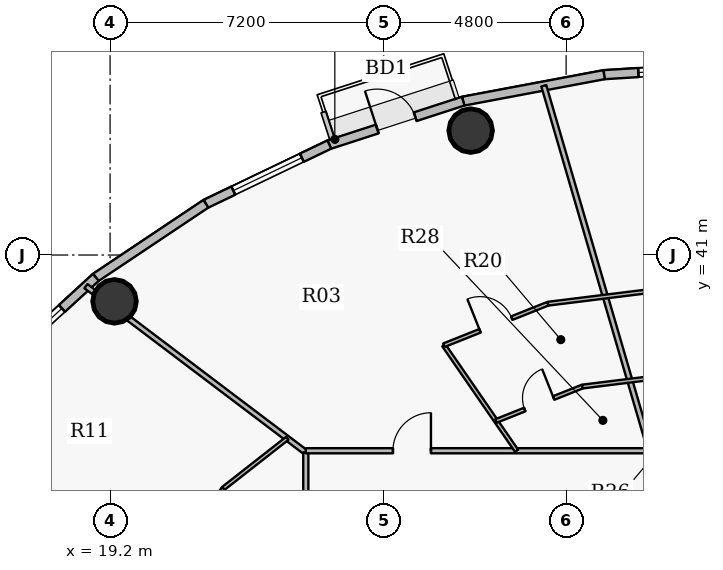
"""IFC4 building model, lengths in metres.
Left out: names, types, materials, properties, quantities, classifications, styles, units other than length and angle.
Written with IfcOpenShell. Run it as: python <this file> out.ifc"""

import sys

from ifc_helpers import new_model, si_unit, direction, frame, frame_2d, origin, origin_2d, place, context, subcontext, project, spatial, rectangle, hollow_circle, extrude, source, transform, mapped, element, fill, save


model = new_model("IFC4")
c1 = context("Model", 3, precision=1e-05, world=origin(), true_north=direction((0.0, 1.0)))
c2 = subcontext(c1, "Body", "Model", "MODEL_VIEW")
j1 = project(units=[si_unit("LENGTHUNIT", "METRE"), si_unit("PLANEANGLEUNIT", "RADIAN")], contexts=[c1])
p1 = place(None, origin())
s1 = spatial("IfcSite", under=j1, at=p1, CompositionType="ELEMENT")
p2 = place(p1, origin())
s2 = spatial("IfcBuilding", under=s1, at=p2, CompositionType="ELEMENT")
p3 = place(p2, frame((0.0, 0.0, 217.8)))
s3 = spatial("IfcBuildingStorey", under=s2, at=p3, CompositionType="ELEMENT", Elevation=217.8)
for number, where, z_axis, x_axis in (
    (1, (28.688, 44.273, 0.0), (0.0, 0.0, 1.0), (1.0, 0.0, 0.0)),
    (2, (19.317, 39.781, 0.0), (0.0, 0.0, 1.0), (1.0, 0.0, 0.0)),
):
    element("IfcColumn", number, at=place(p3, frame(where, z_axis=z_axis, x_axis=x_axis)), inside=s3, PredefinedType="COLUMN", context=c2, shape_type="SweptSolid", body=[
        extrude(hollow_circle(Radius=0.575, WallThickness=0.036, at=origin_2d()), origin(), (0.0, 0.0, 1.0), 3.75),
    ])
p4 = place(p3, frame((32.198, 45.746, 0.0), z_axis=(0.0, 0.0, 1.0), x_axis=(0.998108785312, 0.06147237333, 0.0)))
e3 = element("IfcWall", 3, at=p4, inside=s3, PredefinedType="SOLIDWALL", context=c2, shape_type="SweptSolid", body=[
    extrude(rectangle(XDim=3.809, YDim=0.24, at=frame_2d((1.904, 0.0))), origin(), (0.0, 0.0, 1.0), 3.5),
])
p5 = place(p4, frame((0.905, 0.0, 0.9)))
e4 = element("IfcOpeningElement", 4, at=p5, cuts=e3, PredefinedType="OPENING", context=c2, shape_type="SweptSolid", body=[
    extrude(rectangle(XDim=2.0, YDim=1.75, at=origin_2d()), frame((1.0, 0.13, 0.875), z_axis=(0.0, -1.0, 0.0), x_axis=(1.0, 0.0, 0.0)), (0.0, 0.0, 1.0), 0.26),
])
p6 = place(p3, frame((28.491, 45.049, 0.0), z_axis=(0.0, 0.0, 1.0), x_axis=(0.982784898575, 0.184753465822, 0.0)))
e5 = element("IfcWall", 5, at=p6, inside=s3, PredefinedType="SOLIDWALL", context=c2, shape_type="SweptSolid", body=[
    extrude(rectangle(XDim=3.773, YDim=0.24, at=frame_2d((1.886, 0.0))), origin(), (0.0, 0.0, 1.0), 3.5),
])
p7 = place(p3, frame((24.969, 43.906, 0.0), z_axis=(0.0, 0.0, 1.0), x_axis=(0.951210789182, 0.308541787354, 0.0)))
e6 = element("IfcWall", 6, at=p7, inside=s3, PredefinedType="SOLIDWALL", context=c2, shape_type="SweptSolid", body=[
    extrude(rectangle(XDim=3.702, YDim=0.24, at=frame_2d((1.851, 0.0))), origin(), (0.0, 0.0, 1.0), 3.5),
])
p8 = place(p7, frame((1.326, 0.0, 0.0)))
e7 = element("IfcOpeningElement", 7, at=p8, cuts=e6, PredefinedType="OPENING", context=c2, shape_type="SweptSolid", body=[
    extrude(rectangle(XDim=1.05, YDim=2.15, at=origin_2d()), frame((0.525, 0.13, 1.075), z_axis=(0.0, -1.0, 0.0), x_axis=(1.0, 0.0, 0.0)), (0.0, 0.0, 1.0), 0.26),
])
p9 = place(p3, frame((21.72, 42.348, 0.0), z_axis=(0.0, 0.0, 1.0), x_axis=(0.901598104751, 0.432574684313, 0.0)))
e8 = element("IfcWall", 8, at=p9, inside=s3, PredefinedType="SOLIDWALL", context=c2, shape_type="SweptSolid", body=[
    extrude(rectangle(XDim=3.604, YDim=0.24, at=frame_2d((1.802, 0.0))), origin(), (0.0, 0.0, 1.0), 3.5),
])
p10 = place(p9, frame((0.802, 0.0, 0.9)))
e9 = element("IfcOpeningElement", 9, at=p10, cuts=e8, PredefinedType="OPENING", context=c2, shape_type="SweptSolid", body=[
    extrude(rectangle(XDim=2.0, YDim=1.75, at=origin_2d()), frame((1.0, 0.13, 0.875), z_axis=(0.0, -1.0, 0.0), x_axis=(1.0, 0.0, 0.0)), (0.0, 0.0, 1.0), 0.26),
])
p11 = place(p3, frame((18.824, 40.411, 0.0), z_axis=(0.0, 0.0, 1.0), x_axis=(0.831262496074, 0.555880079352, 0.0)))
e10 = element("IfcWall", 10, at=p11, inside=s3, PredefinedType="SOLIDWALL", context=c2, shape_type="SweptSolid", body=[
    extrude(rectangle(XDim=3.484, YDim=0.24, at=frame_2d((1.742, 0.0))), origin(), (0.0, 0.0, 1.0), 3.5),
])
p12 = place(p3, frame((16.352, 38.145, 0.0), z_axis=(0.0, 0.0, 1.0), x_axis=(0.737123922599, 0.675757591694, 0.0)))
e11 = element("IfcWall", 11, at=p12, inside=s3, PredefinedType="SOLIDWALL", context=c2, shape_type="SweptSolid", body=[
    extrude(rectangle(XDim=3.354, YDim=0.24, at=frame_2d((1.677, 0.0))), origin(), (0.0, 0.0, 1.0), 3.5),
])
p13 = place(p12, frame((0.896, 0.0, 0.9)))
e12 = element("IfcOpeningElement", 12, at=p13, cuts=e11, PredefinedType="OPENING", context=c2, shape_type="SweptSolid", body=[
    extrude(rectangle(XDim=1.25, YDim=1.65, at=origin_2d()), frame((0.625, 0.13, 0.825), z_axis=(0.0, -1.0, 0.0), x_axis=(1.0, 0.0, 0.0)), (0.0, 0.0, 1.0), 0.26),
])
p14 = place(p3, frame((13.997, 34.921, 0.0), z_axis=(0.0, 0.0, 1.0), x_axis=(0.940885654064, -0.338724351023, 0.0)))
e13 = element("IfcWall", 13, at=p14, inside=s3, PredefinedType="PARTITIONING", context=c2, shape_type="SweptSolid", body=[
    extrude(rectangle(XDim=7.082, YDim=0.1, at=frame_2d((3.541, 0.0))), origin(), (0.0, 0.0, 1.0), 2.985),
])
p15 = place(p3, frame((18.565, 40.18, 0.0), z_axis=(0.0, 0.0, 1.0), x_axis=(0.797711861377, -0.603038793295, 0.0)))
e14 = element("IfcWall", 14, at=p15, inside=s3, PredefinedType="PARTITIONING", context=c2, shape_type="SweptSolid", body=[
    extrude(rectangle(XDim=7.252, YDim=0.135, at=frame_2d((3.626, 0.0))), origin(), (0.0, 0.0, 1.0), 2.935),
])
p16 = place(p3, frame((19.756, 31.133, 0.0), z_axis=(0.0, 0.0, 1.0), x_axis=(0.545406924684, 0.83817139447, 0.0)))
e15 = element("IfcWall", 15, at=p16, inside=s3, PredefinedType="PARTITIONING", context=c2, shape_type="SweptSolid", body=[
    extrude(rectangle(XDim=4.448, YDim=0.1, at=frame_2d((2.224, 0.0))), origin(), (0.0, 0.0, 1.0), 2.935),
])
p17 = place(p16, frame((2.583, 0.0, 0.0)))
e16 = element("IfcOpeningElement", 16, at=p17, cuts=e15, PredefinedType="OPENING", context=c2, shape_type="SweptSolid", body=[
    extrude(rectangle(XDim=0.9, YDim=2.1, at=origin_2d()), frame((0.45, 0.06, 1.05), z_axis=(0.0, -1.0, 0.0), x_axis=(1.0, 0.0, 0.0)), (0.0, 0.0, 1.0), 0.12),
])
p18 = place(p3, frame((22.182, 34.861, 0.0), z_axis=(0.0, 0.0, 1.0), x_axis=(0.787401156588, 0.616440928722, 0.0)))
e17 = element("IfcWall", 17, at=p18, inside=s3, PredefinedType="PARTITIONING", context=c2, shape_type="SweptSolid", body=[
    extrude(rectangle(XDim=2.134, YDim=0.1, at=frame_2d((1.067, 0.0))), origin(), (0.0, 0.0, 1.0), 2.935),
])
p19 = place(p3, frame((24.35, 27.95, 0.0), z_axis=(0.0, 0.0, 1.0), x_axis=(0.0, 1.0, 0.0)))
e18 = element("IfcWall", 18, at=p19, inside=s3, PredefinedType="PARTITIONING", context=c2, shape_type="SweptSolid", body=[
    extrude(rectangle(XDim=7.857, YDim=0.135, at=frame_2d((3.929, 0.0))), origin(), (0.0, 0.0, 1.0), 2.935),
])
p20 = place(p19, frame((3.429, 0.0, 0.0)))
e19 = element("IfcOpeningElement", 19, at=p20, cuts=e18, PredefinedType="OPENING", context=c2, shape_type="SweptSolid", body=[
    extrude(rectangle(XDim=1.0, YDim=2.15, at=origin_2d()), frame((0.5, 0.078, 1.075), z_axis=(0.0, -1.0, 0.0), x_axis=(1.0, 0.0, 0.0)), (0.0, 0.0, 1.0), 0.155),
])
p21 = place(p3, frame((24.35, 35.85, 0.0), z_axis=(0.0, 0.0, 1.0), x_axis=(1.0, 0.0, 0.0)))
e20 = element("IfcWall", 20, at=p21, inside=s3, PredefinedType="PARTITIONING", context=c2, shape_type="SweptSolid", body=[
    extrude(rectangle(XDim=26.218, YDim=0.135, at=frame_2d((13.109, 0.0))), origin(), (0.0, 0.0, 1.0), 2.935),
])
p22 = place(p21, frame((21.507, 0.0, 0.0)))
e21 = element("IfcOpeningElement", 21, at=p22, cuts=e20, PredefinedType="OPENING", context=c2, shape_type="SweptSolid", body=[
    extrude(rectangle(XDim=1.0, YDim=2.15, at=origin_2d()), frame((0.5, 0.078, 1.075), z_axis=(0.0, -1.0, 0.0), x_axis=(1.0, 0.0, 0.0)), (0.0, 0.0, 1.0), 0.155),
])
p23 = place(p21, frame((12.95, 0.0, 0.0)))
e22 = element("IfcOpeningElement", 22, at=p23, cuts=e20, PredefinedType="OPENING", context=c2, shape_type="SweptSolid", body=[
    extrude(rectangle(XDim=1.0, YDim=2.15, at=origin_2d()), frame((0.5, 0.078, 1.075), z_axis=(0.0, -1.0, 0.0), x_axis=(1.0, 0.0, 0.0)), (0.0, 0.0, 1.0), 0.155),
])
p24 = place(p21, frame((2.293, 0.0, 0.0)))
e23 = element("IfcOpeningElement", 23, at=p24, cuts=e20, PredefinedType="OPENING", context=c2, shape_type="SweptSolid", body=[
    extrude(rectangle(XDim=1.0, YDim=2.15, at=origin_2d()), frame((0.5, 0.078, 1.075), z_axis=(0.0, -1.0, 0.0), x_axis=(1.0, 0.0, 0.0)), (0.0, 0.0, 1.0), 0.155),
])
p25 = place(p3, frame((27.982, 38.626, 0.0), z_axis=(0.0, 0.0, 1.0), x_axis=(0.56776340906, -0.823191782838, 0.0)))
e24 = element("IfcWall", 24, at=p25, inside=s3, PredefinedType="PARTITIONING", context=c2, shape_type="SweptSolid", body=[
    extrude(rectangle(XDim=3.372, YDim=0.1, at=frame_2d((1.686, 0.0))), origin(), (0.0, 0.0, 1.0), 3.5),
])
p26 = place(p3, frame((27.982, 38.626, 0.0), z_axis=(0.0, 0.0, 1.0), x_axis=(0.928795965169, 0.370591493542, 0.0)))
e25 = element("IfcWall", 25, at=p26, inside=s3, PredefinedType="PARTITIONING", context=c2, shape_type="SweptSolid", body=[
    extrude(rectangle(XDim=2.95, YDim=0.1, at=frame_2d((1.475, 0.0))), origin(), (0.0, 0.0, 1.0), 2.935),
])
p27 = place(p26, frame((1.025, 0.0, 0.0)))
e26 = element("IfcOpeningElement", 26, at=p27, cuts=e25, PredefinedType="OPENING", context=c2, shape_type="SweptSolid", body=[
    extrude(rectangle(XDim=0.9, YDim=2.1, at=origin_2d()), frame((0.45, 0.06, 1.05), z_axis=(0.0, -1.0, 0.0), x_axis=(1.0, 0.0, 0.0)), (0.0, 0.0, 1.0), 0.12),
])
p28 = place(p3, frame((29.356, 36.633, 0.0), z_axis=(0.0, 0.0, 1.0), x_axis=(0.928806968298, 0.370563915731, 0.0)))
e27 = element("IfcWall", 27, at=p28, inside=s3, PredefinedType="PARTITIONING", context=c2, shape_type="SweptSolid", body=[
    extrude(rectangle(XDim=2.444, YDim=0.1, at=frame_2d((1.222, 0.0))), origin(), (0.0, 0.0, 1.0), 2.935),
])
p29 = place(p28, frame((0.812, 0.0, 0.0)))
e28 = element("IfcOpeningElement", 28, at=p29, cuts=e27, PredefinedType="OPENING", context=c2, shape_type="SweptSolid", body=[
    extrude(rectangle(XDim=0.82, YDim=2.1, at=origin_2d()), frame((0.41, 0.06, 1.05), z_axis=(0.0, -1.0, 0.0), x_axis=(1.0, 0.0, 0.0)), (0.0, 0.0, 1.0), 0.12),
])
p30 = place(p3, frame((30.613, 45.453, 0.0), z_axis=(0.0, 0.0, 1.0), x_axis=(0.280222100614, -0.959935192775, 0.0)))
e29 = element("IfcWall", 29, at=p30, inside=s3, PredefinedType="PARTITIONING", context=c2, shape_type="SweptSolid", body=[
    extrude(rectangle(XDim=10.004, YDim=0.135, at=frame_2d((5.002, 0.0))), origin(), (0.0, 0.0, 1.0), 2.985),
])
p31 = place(p3, frame((30.722, 39.719, 0.0), z_axis=(0.0, 0.0, 1.0), x_axis=(0.992398169186, 0.123068573551, 0.0)))
e30 = element("IfcWall", 30, at=p31, inside=s3, PredefinedType="PARTITIONING", context=c2, shape_type="SweptSolid", body=[
    extrude(rectangle(XDim=5.319, YDim=0.1, at=frame_2d((2.659, 0.0))), origin(), (0.0, 0.0, 1.0), 2.935),
])
p32 = place(p31, frame((2.95, 0.0, 0.0)))
e31 = element("IfcOpeningElement", 31, at=p32, cuts=e30, PredefinedType="OPENING", context=c2, shape_type="SweptSolid", body=[
    extrude(rectangle(XDim=0.9, YDim=2.1, at=origin_2d()), frame((0.45, 0.06, 1.05), z_axis=(0.0, -1.0, 0.0), x_axis=(1.0, 0.0, 0.0)), (0.0, 0.0, 1.0), 0.12),
])
p33 = place(p3, frame((31.627, 37.539, 0.0), z_axis=(0.0, 0.0, 1.0), x_axis=(0.992401810072, 0.123039210683, 0.0)))
e32 = element("IfcWall", 32, at=p33, inside=s3, PredefinedType="PARTITIONING", context=c2, shape_type="SweptSolid", body=[
    extrude(rectangle(XDim=4.407, YDim=0.1, at=frame_2d((2.204, 0.0))), origin(), (0.0, 0.0, 1.0), 2.935),
])
m1 = source(origin(), c2, "Body", "SweptSolid", [
    extrude(rectangle(XDim=2.0, YDim=1.75, at=origin_2d()), frame((1.0, 0.03, 0.875), z_axis=(0.0, -1.0, 0.0), x_axis=(1.0, 0.0, 0.0)), (0.0, 0.0, 1.0), 0.06),
])
p34 = place(p5, origin())
e33 = element("IfcWindow", 33, at=p34, inside=s3, PartitioningType="DOUBLE_PANEL_VERTICAL", PredefinedType="WINDOW", context=c2, shape_type="MappedRepresentation", body=[
    mapped(m1, transform((0.0, 0.0, 0.0), x_axis=(1.0, 0.0, 0.0), y_axis=(0.0, 1.0, 0.0), z_axis=(0.0, 0.0, 1.0), scale=1.0)),
])
fill(e4, e33)
m2 = source(origin(), c2, "Body", "SweptSolid", [
    extrude(rectangle(XDim=1.05, YDim=2.15, at=origin_2d()), frame((0.525, 0.025, 1.075), z_axis=(0.0, -1.0, 0.0), x_axis=(1.0, 0.0, 0.0)), (0.0, 0.0, 1.0), 0.05),
])
p35 = place(p8, origin())
e34 = element("IfcDoor", 34, at=p35, inside=s3, OperationType="SINGLE_SWING_LEFT", PredefinedType="DOOR", context=c2, shape_type="MappedRepresentation", body=[
    mapped(m2, transform((0.0, 0.0, 0.0), x_axis=(1.0, 0.0, 0.0), y_axis=(0.0, 1.0, 0.0), z_axis=(0.0, 0.0, 1.0), scale=1.0)),
])
fill(e7, e34)
p36 = place(p10, origin())
e35 = element("IfcWindow", 35, at=p36, inside=s3, PartitioningType="DOUBLE_PANEL_VERTICAL", PredefinedType="WINDOW", context=c2, shape_type="MappedRepresentation", body=[
    mapped(m1, transform((0.0, 0.0, 0.0), x_axis=(1.0, 0.0, 0.0), y_axis=(0.0, 1.0, 0.0), z_axis=(0.0, 0.0, 1.0), scale=1.0)),
])
fill(e9, e35)
m3 = source(origin(), c2, "Body", "SweptSolid", [
    extrude(rectangle(XDim=1.25, YDim=1.65, at=origin_2d()), frame((0.625, 0.03, 0.825), z_axis=(0.0, -1.0, 0.0), x_axis=(1.0, 0.0, 0.0)), (0.0, 0.0, 1.0), 0.06),
])
p37 = place(p13, origin())
e36 = element("IfcWindow", 36, at=p37, inside=s3, PartitioningType="SINGLE_PANEL", PredefinedType="WINDOW", context=c2, shape_type="MappedRepresentation", body=[
    mapped(m3, transform((0.0, 0.0, 0.0), x_axis=(1.0, 0.0, 0.0), y_axis=(0.0, 1.0, 0.0), z_axis=(0.0, 0.0, 1.0), scale=1.0)),
])
fill(e12, e36)
m4 = source(origin(), c2, "Body", "SweptSolid", [
    extrude(rectangle(XDim=1.0, YDim=2.15, at=origin_2d()), frame((0.5, 0.025, 1.075), z_axis=(0.0, -1.0, 0.0), x_axis=(1.0, 0.0, 0.0)), (0.0, 0.0, 1.0), 0.05),
])
p38 = place(p24, origin())
e37 = element("IfcDoor", 37, at=p38, inside=s3, OperationType="SINGLE_SWING_RIGHT", PredefinedType="DOOR", context=c2, shape_type="MappedRepresentation", body=[
    mapped(m4, transform((0.0, 0.0, 0.0), x_axis=(1.0, 0.0, 0.0), y_axis=(0.0, 1.0, 0.0), z_axis=(0.0, 0.0, 1.0), scale=1.0)),
])
fill(e23, e37)
m5 = source(origin(), c2, "Body", "SweptSolid", [
    extrude(rectangle(XDim=0.9, YDim=2.1, at=origin_2d()), frame((0.45, 0.025, 1.05), z_axis=(0.0, -1.0, 0.0), x_axis=(1.0, 0.0, 0.0)), (0.0, 0.0, 1.0), 0.05),
])
p39 = place(p27, origin())
e38 = element("IfcDoor", 38, at=p39, inside=s3, OperationType="SINGLE_SWING_LEFT", PredefinedType="DOOR", context=c2, shape_type="MappedRepresentation", body=[
    mapped(m5, transform((0.0, 0.0, 0.0), x_axis=(1.0, 0.0, 0.0), y_axis=(0.0, 1.0, 0.0), z_axis=(0.0, 0.0, 1.0), scale=1.0)),
])
fill(e26, e38)
m6 = source(origin(), c2, "Body", "SweptSolid", [
    extrude(rectangle(XDim=0.82, YDim=2.1, at=origin_2d()), frame((0.41, 0.025, 1.05), z_axis=(0.0, -1.0, 0.0), x_axis=(1.0, 0.0, 0.0)), (0.0, 0.0, 1.0), 0.05),
])
p40 = place(p29, origin())
e39 = element("IfcDoor", 39, at=p40, inside=s3, OperationType="SINGLE_SWING_RIGHT", PredefinedType="DOOR", context=c2, shape_type="MappedRepresentation", body=[
    mapped(m6, transform((0.0, 0.0, 0.0), x_axis=(1.0, 0.0, 0.0), y_axis=(0.0, 1.0, 0.0), z_axis=(0.0, 0.0, 1.0), scale=1.0)),
])
fill(e28, e39)
save(model, sys.argv[1])
